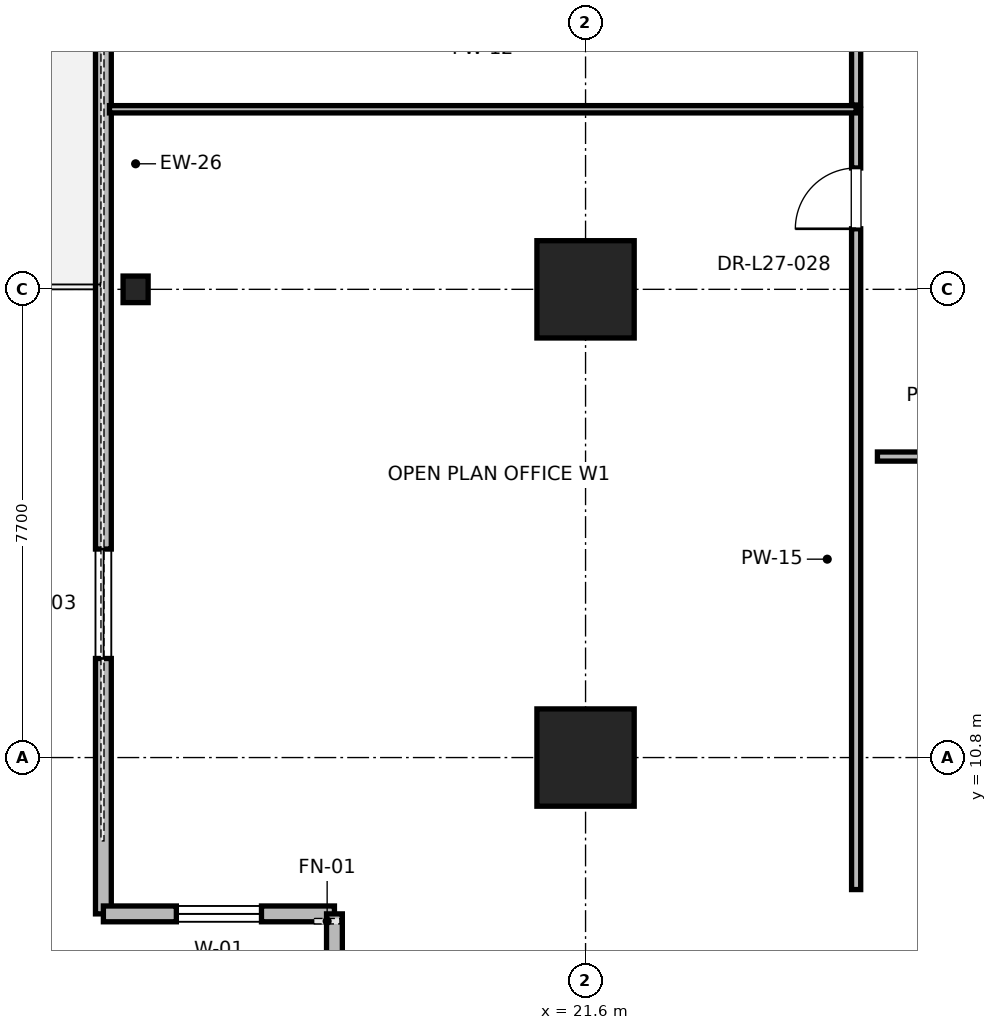
"""IFC4 building model, lengths in metres.
Left out: names, types, materials, properties, quantities, classifications, styles, units other than length and angle.
Written with IfcOpenShell. Run it as: python <this file> out.ifc"""

import sys

from ifc_helpers import new_model, si_unit, direction, frame, frame_2d, origin, origin_2d, place, context, subcontext, project, spatial, rectangle, i_section, extrude, element, fill, save


model = new_model("IFC4")
c1 = context("Model", 3, precision=1e-05, world=origin(), true_north=direction((0.0, 1.0)))
c2 = subcontext(c1, "Body", "Model", "MODEL_VIEW")
j1 = project(units=[si_unit("LENGTHUNIT", "METRE"), si_unit("PLANEANGLEUNIT", "RADIAN")], contexts=[c1])
p1 = place(None, origin())
s1 = spatial("IfcSite", under=j1, at=p1, CompositionType="ELEMENT")
p2 = place(p1, origin())
s2 = spatial("IfcBuilding", under=s1, at=p2, CompositionType="ELEMENT")
p3 = place(p2, frame((0.0, 0.0, 118.4)))
s3 = spatial("IfcBuildingStorey", under=s2, at=p3, CompositionType="ELEMENT", Elevation=118.4)
for number, where, z_axis, x_axis in (
    (1, (21.6, 18.5, 0.0), (0.0, 0.0, 1.0), (1.0, 0.0, 0.0)),
    (2, (21.6, 10.8, 0.0), (0.0, 0.0, 1.0), (1.0, 0.0, 0.0)),
):
    element("IfcColumn", number, at=place(p3, frame(where, z_axis=z_axis, x_axis=x_axis)), inside=s3, PredefinedType="COLUMN", context=c2, shape_type="SweptSolid", body=[
        extrude(rectangle(XDim=1.6, YDim=1.6, at=origin_2d()), origin(), (0.0, 0.0, 1.0), 5.0),
    ])
p4 = place(p3, frame((14.2, 18.5, 0.0), z_axis=(0.0, 0.0, 1.0), x_axis=(1.0, 0.0, 0.0)))
e3 = element("IfcColumn", 3, at=p4, inside=s3, PredefinedType="COLUMN", context=c2, shape_type="SweptSolid", body=[
    extrude(i_section(OverallWidth=0.412, OverallDepth=0.437, WebThickness=0.036, FlangeThickness=0.058, FilletRadius=0.015, at=origin_2d()), origin(), (0.0, 0.0, 1.0), 5.0),
])
p5 = place(p3, frame((13.67, 46.771, 0.0), z_axis=(0.0, 0.0, 1.0), x_axis=(0.0, -1.0, 0.0)))
e4 = element("IfcWall", 4, at=p5, inside=s3, PredefinedType="PARAPET", context=c2, shape_type="SweptSolid", body=[
    extrude(rectangle(XDim=38.542, YDim=0.26, at=frame_2d((19.271, 0.0))), origin(), (0.0, 0.0, 1.0), 3.91),
])
p6 = place(p5, frame((4.2, 0.0, 0.85)))
e5 = element("IfcOpeningElement", 5, at=p6, cuts=e4, PredefinedType="OPENING", context=c2, shape_type="SweptSolid", body=[
    extrude(rectangle(XDim=1.8, YDim=2.2, at=frame_2d((0.9, 1.1))), frame((0.0, 0.13, 0.0), z_axis=(0.0, -1.0, 0.0), x_axis=(1.0, 0.0, 0.0)), (0.0, 0.0, 1.0), 0.26),
])
p7 = place(p5, frame((18.671, 0.0, 0.0)))
e6 = element("IfcOpeningElement", 6, at=p7, cuts=e4, PredefinedType="OPENING", context=c2, shape_type="SweptSolid", body=[
    extrude(rectangle(XDim=1.2, YDim=2.2, at=frame_2d((0.6, 1.1))), frame((0.0, 0.13, 0.0), z_axis=(0.0, -1.0, 0.0), x_axis=(1.0, 0.0, 0.0)), (0.0, 0.0, 1.0), 0.26),
])
p8 = place(p5, frame((32.542, 0.0, 0.85)))
e7 = element("IfcOpeningElement", 7, at=p8, cuts=e4, PredefinedType="OPENING", context=c2, shape_type="SweptSolid", body=[
    extrude(rectangle(XDim=1.8, YDim=2.2, at=frame_2d((0.9, 1.1))), frame((0.0, 0.13, 0.0), z_axis=(0.0, -1.0, 0.0), x_axis=(1.0, 0.0, 0.0)), (0.0, 0.0, 1.0), 0.26),
])
p9 = place(p3, frame((13.67, 8.229, 0.0), z_axis=(0.0, 0.0, 1.0), x_axis=(1.0, 0.0, 0.0)))
e8 = element("IfcWall", 8, at=p9, inside=s3, PredefinedType="PARAPET", context=c2, shape_type="SweptSolid", body=[
    extrude(rectangle(XDim=3.8, YDim=0.26, at=frame_2d((1.9, 0.0))), origin(), (0.0, 0.0, 1.0), 4.7),
])
p10 = place(p9, frame((1.2, 0.0, 0.85)))
e9 = element("IfcOpeningElement", 9, at=p10, cuts=e8, PredefinedType="OPENING", context=c2, shape_type="SweptSolid", body=[
    extrude(rectangle(XDim=1.4, YDim=2.0, at=frame_2d((0.7, 1.0))), frame((0.0, 0.13, 0.0), z_axis=(0.0, -1.0, 0.0), x_axis=(1.0, 0.0, 0.0)), (0.0, 0.0, 1.0), 0.26),
])
p11 = place(p3, frame((17.47, 8.229, 0.0), z_axis=(0.0, 0.0, 1.0), x_axis=(0.0, -1.0, 0.0)))
e10 = element("IfcWall", 10, at=p11, inside=s3, PredefinedType="PARAPET", context=c2, shape_type="SweptSolid", body=[
    extrude(rectangle(XDim=3.4, YDim=0.26, at=frame_2d((1.7, 0.0))), origin(), (0.0, 0.0, 1.0), 4.7),
])
p12 = place(p3, frame((26.4, 15.75, 0.0), z_axis=(0.0, 0.0, 1.0), x_axis=(1.0, 0.0, 0.0)))
e11 = element("IfcWall", 11, at=p12, inside=s3, PredefinedType="PARTITIONING", context=c2, shape_type="SweptSolid", body=[
    extrude(rectangle(XDim=4.896, YDim=0.15, at=frame_2d((2.448, 0.0))), origin(), (0.0, 0.0, 1.0), 2.85),
])
p13 = place(p12, frame((1.963, 0.0, 0.0)))
e12 = element("IfcOpeningElement", 12, at=p13, cuts=e11, PredefinedType="OPENING", context=c2, shape_type="SweptSolid", body=[
    extrude(rectangle(XDim=1.0, YDim=2.15, at=frame_2d((0.5, 1.075))), frame((0.0, 0.075, 0.0), z_axis=(0.0, -1.0, 0.0), x_axis=(1.0, 0.0, 0.0)), (0.0, 0.0, 1.0), 0.15),
])
p14 = place(p3, frame((26.05, 8.629, 0.0), z_axis=(0.0, 0.0, 1.0), x_axis=(0.0, 1.0, 0.0)))
e13 = element("IfcWall", 13, at=p14, inside=s3, PredefinedType="PARTITIONING", context=c2, shape_type="SweptSolid", body=[
    extrude(rectangle(XDim=12.832, YDim=0.15, at=frame_2d((6.416, 0.0))), origin(), (0.0, 0.0, 1.0), 2.85),
])
p15 = place(p14, frame((10.867, 0.0, 0.0)))
e14 = element("IfcOpeningElement", 14, at=p15, cuts=e13, PredefinedType="OPENING", context=c2, shape_type="SweptSolid", body=[
    extrude(rectangle(XDim=1.0, YDim=2.15, at=frame_2d((0.5, 1.075))), frame((0.0, 0.075, 0.0), z_axis=(0.0, -1.0, 0.0), x_axis=(1.0, 0.0, 0.0)), (0.0, 0.0, 1.0), 0.15),
])
p16 = place(p3, frame((13.77, 21.461, 0.0), z_axis=(0.0, 0.0, 1.0), x_axis=(1.0, 0.0, 0.0)))
e15 = element("IfcWall", 15, at=p16, inside=s3, PredefinedType="PARTITIONING", context=c2, shape_type="SweptSolid", body=[
    extrude(rectangle(XDim=12.28, YDim=0.12, at=frame_2d((6.14, 0.0))), origin(), (0.0, 0.0, 1.0), 2.85),
])
p17 = place(p3, frame((26.05, 21.531, 0.0), z_axis=(0.0, 0.0, 1.0), x_axis=(0.0, 1.0, 0.0)))
e16 = element("IfcWall", 16, at=p17, inside=s3, PredefinedType="PARTITIONING", context=c2, shape_type="SweptSolid", body=[
    extrude(rectangle(XDim=12.762, YDim=0.15, at=frame_2d((6.381, 0.0))), origin(), (0.0, 0.0, 1.0), 2.85),
])
p18 = place(p17, frame((5.821, 0.0, 0.0)))
e17 = element("IfcOpeningElement", 17, at=p18, cuts=e16, PredefinedType="OPENING", context=c2, shape_type="SweptSolid", body=[
    extrude(rectangle(XDim=1.05, YDim=2.2, at=frame_2d((0.525, 1.1))), frame((0.0, 0.075, 0.0), z_axis=(0.0, -1.0, 0.0), x_axis=(1.0, 0.0, 0.0)), (0.0, 0.0, 1.0), 0.15),
])
p19 = place(p8, origin())
e18 = element("IfcWindow", 18, at=p19, inside=s3, PartitioningType="SINGLE_PANEL", PredefinedType="WINDOW", context=c2, shape_type="SweptSolid", body=[
    extrude(rectangle(XDim=1.8, YDim=2.2, at=frame_2d((0.9, 1.1))), frame((0.0, 0.03, 0.0), z_axis=(0.0, -1.0, 0.0), x_axis=(1.0, 0.0, 0.0)), (0.0, 0.0, 1.0), 0.06),
])
fill(e7, e18)
p20 = place(p10, origin())
e19 = element("IfcWindow", 19, at=p20, inside=s3, PartitioningType="SINGLE_PANEL", PredefinedType="WINDOW", context=c2, shape_type="SweptSolid", body=[
    extrude(rectangle(XDim=1.4, YDim=2.0, at=frame_2d((0.7, 1.0))), frame((0.0, 0.03, 0.0), z_axis=(0.0, -1.0, 0.0), x_axis=(1.0, 0.0, 0.0)), (0.0, 0.0, 1.0), 0.06),
])
fill(e9, e19)
p21 = place(p15, origin())
e20 = element("IfcDoor", 20, at=p21, inside=s3, OperationType="SINGLE_SWING_LEFT", PredefinedType="DOOR", context=c2, shape_type="SweptSolid", body=[
    extrude(rectangle(XDim=1.0, YDim=2.15, at=frame_2d((0.5, 1.075))), frame((0.0, 0.025, 0.0), z_axis=(0.0, -1.0, 0.0), x_axis=(1.0, 0.0, 0.0)), (0.0, 0.0, 1.0), 0.05),
])
fill(e14, e20)
save(model, sys.argv[1])
